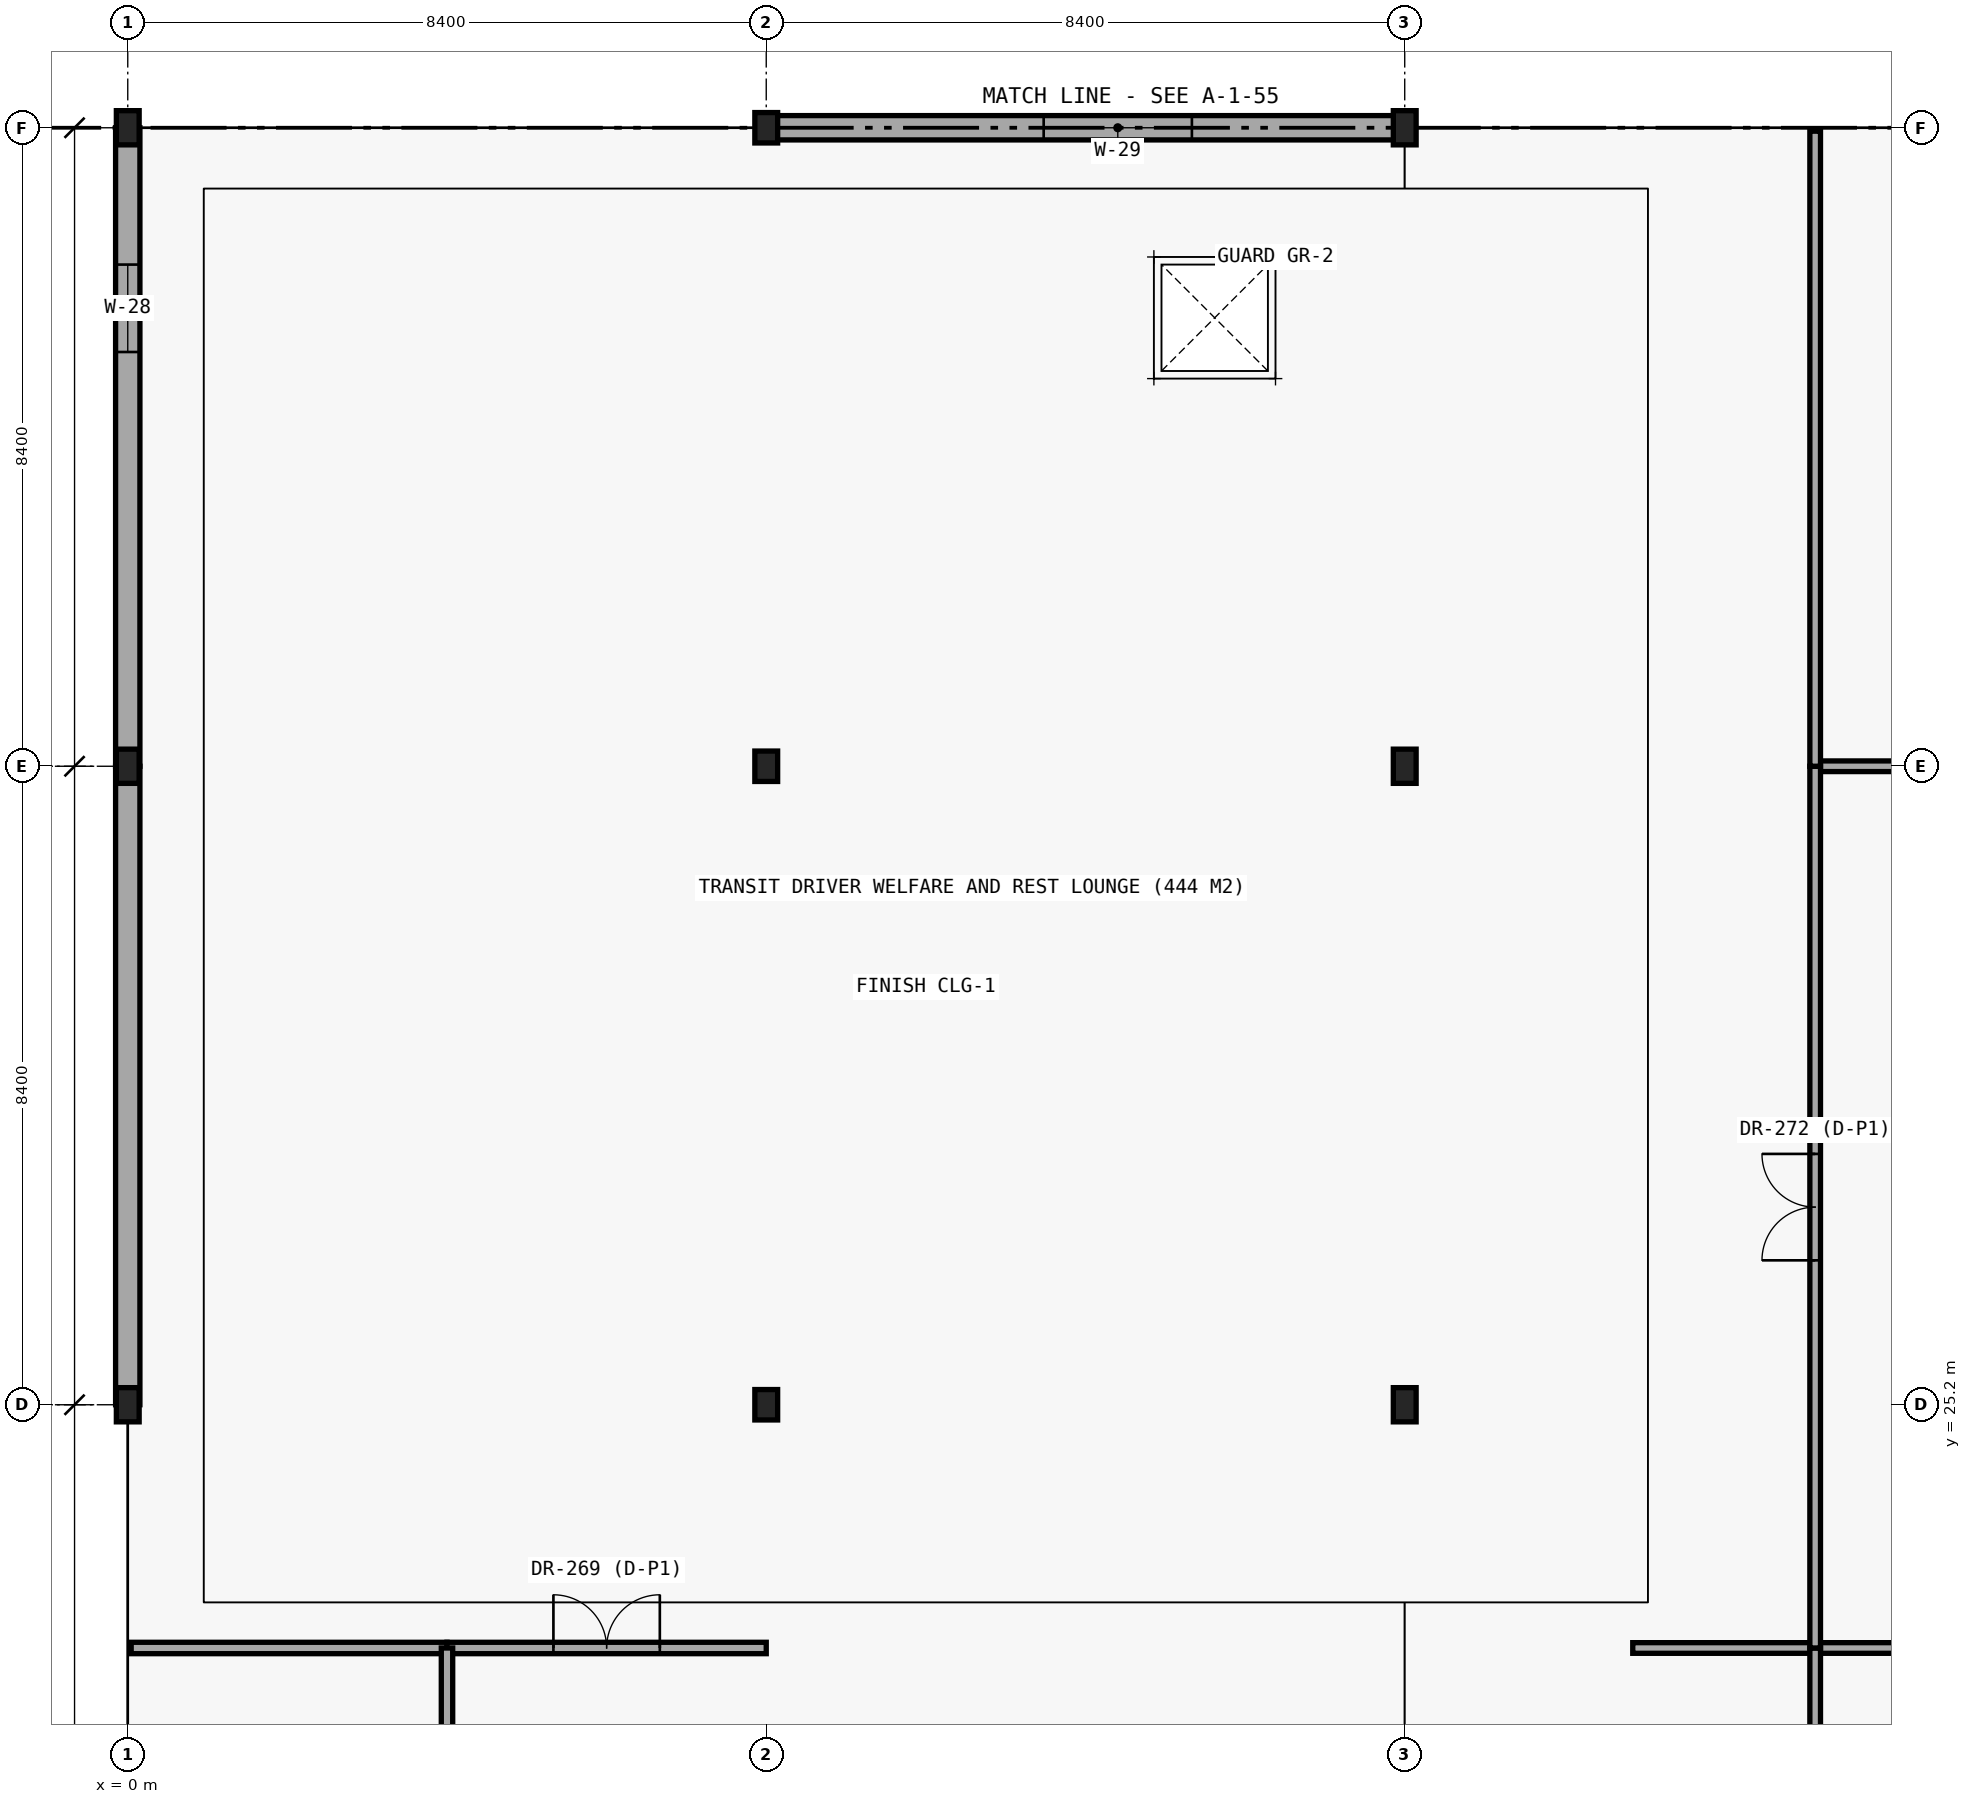
"""IFC4 building model, lengths in metres.
Left out: names, types, materials, properties, quantities, classifications, styles, units other than length and angle.
Written with IfcOpenShell. Run it as: python <this file> out.ifc"""

import sys

from ifc_helpers import new_model, si_unit, direction, frame, frame_2d, origin, origin_2d, place, context, subcontext, project, spatial, rectangle, i_section, extrude, element, fill, save


model = new_model("IFC4")
c1 = context("Model", 3, precision=1e-05, world=origin(), true_north=direction((0.0, 1.0)))
c2 = subcontext(c1, "Body", "Model", "MODEL_VIEW")
j1 = project(units=[si_unit("LENGTHUNIT", "METRE"), si_unit("PLANEANGLEUNIT", "RADIAN")], contexts=[c1])
p1 = place(None, origin())
s1 = spatial("IfcSite", under=j1, at=p1, CompositionType="ELEMENT")
p2 = place(p1, origin())
s2 = spatial("IfcBuilding", under=s1, at=p2, CompositionType="ELEMENT")
p3 = place(p2, frame((0.0, 0.0, 21.6)))
s3 = spatial("IfcBuildingStorey", under=s2, at=p3, CompositionType="ELEMENT", Elevation=21.6)
for number, where, z_axis, x_axis in (
    (1, (0.0, 25.2, 0.0), (0.0, 0.0, 1.0), (1.0, 0.0, 0.0)),
    (2, (0.0, 33.6, 0.0), (0.0, 0.0, 1.0), (1.0, 0.0, 0.0)),
):
    element("IfcColumn", number, at=place(p3, frame(where, z_axis=z_axis, x_axis=x_axis)), inside=s3, PredefinedType="COLUMN", context=c2, shape_type="SweptSolid", body=[
        extrude(i_section(OverallWidth=0.3, OverallDepth=0.45, WebThickness=0.014, FlangeThickness=0.026, FilletRadius=0.027, at=origin_2d()), origin(), (0.0, 0.0, 1.0), 4.8),
    ])
p4 = place(p3, frame((0.0, 42.0, 0.0), z_axis=(0.0, 0.0, 1.0), x_axis=(1.0, 0.0, 0.0)))
e3 = element("IfcColumn", 3, at=p4, inside=s3, PredefinedType="COLUMN", context=c2, shape_type="SweptSolid", body=[
    extrude(i_section(OverallWidth=0.3, OverallDepth=0.45, WebThickness=0.014, FlangeThickness=0.026, FilletRadius=0.027, at=origin_2d()), origin(), (0.0, 0.0, 1.0), 4.558),
])
for number, where, z_axis, x_axis in (
    (4, (8.4, 25.2, 0.0), (0.0, 0.0, 1.0), (1.0, 0.0, 0.0)),
    (5, (8.4, 33.6, 0.0), (0.0, 0.0, 1.0), (1.0, 0.0, 0.0)),
):
    element("IfcColumn", number, at=place(p3, frame(where, z_axis=z_axis, x_axis=x_axis)), inside=s3, PredefinedType="COLUMN", context=c2, shape_type="SweptSolid", body=[
        extrude(i_section(OverallWidth=0.3, OverallDepth=0.4, WebThickness=0.013, FlangeThickness=0.024, FilletRadius=0.027, at=origin_2d()), origin(), (0.0, 0.0, 1.0), 4.8),
    ])
p5 = place(p3, frame((8.4, 42.0, 0.0), z_axis=(0.0, 0.0, 1.0), x_axis=(1.0, 0.0, 0.0)))
e6 = element("IfcColumn", 6, at=p5, inside=s3, PredefinedType="COLUMN", context=c2, shape_type="SweptSolid", body=[
    extrude(i_section(OverallWidth=0.3, OverallDepth=0.4, WebThickness=0.013, FlangeThickness=0.024, FilletRadius=0.027, at=origin_2d()), origin(), (0.0, 0.0, 1.0), 4.558),
])
for number, where, z_axis, x_axis in (
    (7, (16.8, 25.2, 0.0), (0.0, 0.0, 1.0), (1.0, 0.0, 0.0)),
    (8, (16.8, 33.6, 0.0), (0.0, 0.0, 1.0), (1.0, 0.0, 0.0)),
):
    element("IfcColumn", number, at=place(p3, frame(where, z_axis=z_axis, x_axis=x_axis)), inside=s3, PredefinedType="COLUMN", context=c2, shape_type="SweptSolid", body=[
        extrude(i_section(OverallWidth=0.3, OverallDepth=0.45, WebThickness=0.014, FlangeThickness=0.026, FilletRadius=0.027, at=origin_2d()), origin(), (0.0, 0.0, 1.0), 4.8),
    ])
p6 = place(p3, frame((16.8, 42.0, 0.0), z_axis=(0.0, 0.0, 1.0), x_axis=(1.0, 0.0, 0.0)))
e9 = element("IfcColumn", 9, at=p6, inside=s3, PredefinedType="COLUMN", context=c2, shape_type="SweptSolid", body=[
    extrude(i_section(OverallWidth=0.3, OverallDepth=0.45, WebThickness=0.014, FlangeThickness=0.026, FilletRadius=0.027, at=origin_2d()), origin(), (0.0, 0.0, 1.0), 4.558),
])
p7 = place(p3, frame((0.0, 33.6, 0.0), z_axis=(0.0, 0.0, 1.0), x_axis=(0.0, -1.0, 0.0)))
e10 = element("IfcWall", 10, at=p7, inside=s3, PredefinedType="STANDARD", context=c2, shape_type="SweptSolid", body=[
    extrude(rectangle(XDim=8.4, YDim=0.32, at=frame_2d((4.2, 0.0))), origin(), (0.0, 0.0, 1.0), 4.22),
])
p8 = place(p3, frame((0.0, 42.0, 0.0), z_axis=(0.0, 0.0, 1.0), x_axis=(0.0, -1.0, 0.0)))
e11 = element("IfcWall", 11, at=p8, inside=s3, PredefinedType="STANDARD", context=c2, shape_type="SweptSolid", body=[
    extrude(rectangle(XDim=8.4, YDim=0.32, at=frame_2d((4.2, 0.0))), origin(), (0.0, 0.0, 1.0), 4.22),
])
p9 = place(p8, frame((1.8, 0.0, 0.85)))
e12 = element("IfcOpeningElement", 12, at=p9, cuts=e11, PredefinedType="OPENING", context=c2, shape_type="SweptSolid", body=[
    extrude(rectangle(XDim=1.15, YDim=2.35, at=frame_2d((0.575, 1.175))), frame((0.0, 0.17, 0.0), z_axis=(0.0, -1.0, 0.0), x_axis=(1.0, 0.0, 0.0)), (0.0, 0.0, 1.0), 0.34),
])
p10 = place(p3, frame((16.8, 42.0, 0.0), z_axis=(0.0, 0.0, 1.0), x_axis=(-1.0, 0.0, 0.0)))
e13 = element("IfcWall", 13, at=p10, inside=s3, PredefinedType="STANDARD", context=c2, shape_type="SweptSolid", body=[
    extrude(rectangle(XDim=8.4, YDim=0.32, at=frame_2d((4.2, 0.0))), origin(), (0.0, 0.0, 1.0), 4.22),
])
p11 = place(p10, frame((2.8, 0.0, 0.85)))
e14 = element("IfcOpeningElement", 14, at=p11, cuts=e13, PredefinedType="OPENING", context=c2, shape_type="SweptSolid", body=[
    extrude(rectangle(XDim=1.95, YDim=2.3, at=frame_2d((0.975, 1.15))), frame((0.0, 0.17, 0.0), z_axis=(0.0, -1.0, 0.0), x_axis=(1.0, 0.0, 0.0)), (0.0, 0.0, 1.0), 0.34),
])
p12 = place(p3, frame((0.045, 22.0, 0.0), z_axis=(0.0, 0.0, 1.0), x_axis=(1.0, 0.0, 0.0)))
e15 = element("IfcWall", 15, at=p12, inside=s3, PredefinedType="PARTITIONING", context=c2, shape_type="SweptSolid", body=[
    extrude(rectangle(XDim=4.155, YDim=0.15, at=frame_2d((2.078, 0.0))), origin(), (0.0, 0.0, 1.0), 4.1),
])
p13 = place(p3, frame((4.2, 22.0, 0.0), z_axis=(0.0, 0.0, 1.0), x_axis=(1.0, 0.0, 0.0)))
e16 = element("IfcWall", 16, at=p13, inside=s3, PredefinedType="PARTITIONING", context=c2, shape_type="SweptSolid", body=[
    extrude(rectangle(XDim=4.2, YDim=0.15, at=frame_2d((2.1, 0.0))), origin(), (0.0, 0.0, 1.0), 4.1),
])
p14 = place(p13, frame((1.4, 0.0, 0.0)))
e17 = element("IfcOpeningElement", 17, at=p14, cuts=e16, PredefinedType="OPENING", context=c2, shape_type="SweptSolid", body=[
    extrude(rectangle(XDim=1.4, YDim=2.25, at=frame_2d((0.7, 1.125))), frame((0.0, 0.085, 0.0), z_axis=(0.0, -1.0, 0.0), x_axis=(1.0, 0.0, 0.0)), (0.0, 0.0, 1.0), 0.17),
])
p15 = place(p3, frame((19.8, 22.0, 0.0), z_axis=(0.0, 0.0, 1.0), x_axis=(1.0, 0.0, 0.0)))
e18 = element("IfcWall", 18, at=p15, inside=s3, PredefinedType="PARTITIONING", context=c2, shape_type="SweptSolid", body=[
    extrude(rectangle(XDim=2.4, YDim=0.14, at=frame_2d((1.2, 0.0))), origin(), (0.0, 0.0, 1.0), 4.1),
])
p16 = place(p3, frame((22.2, 22.0, 0.0), z_axis=(0.0, 0.0, 1.0), x_axis=(1.0, 0.0, 0.0)))
e19 = element("IfcWall", 19, at=p16, inside=s3, PredefinedType="PARTITIONING", context=c2, shape_type="SweptSolid", body=[
    extrude(rectangle(XDim=11.4, YDim=0.14, at=frame_2d((5.7, 0.0))), origin(), (0.0, 0.0, 1.0), 4.1),
])
p17 = place(p3, frame((22.2, 33.6, 0.0), z_axis=(0.0, 0.0, 1.0), x_axis=(1.0, 0.0, 0.0)))
e20 = element("IfcWall", 20, at=p17, inside=s3, PredefinedType="PARTITIONING", context=c2, shape_type="SweptSolid", body=[
    extrude(rectangle(XDim=11.4, YDim=0.14, at=frame_2d((5.7, 0.0))), origin(), (0.0, 0.0, 1.0), 4.1),
])
p18 = place(p17, frame((8.22, 0.0, 0.0)))
e21 = element("IfcOpeningElement", 21, at=p18, cuts=e20, PredefinedType="OPENING", context=c2, shape_type="SweptSolid", body=[
    extrude(rectangle(XDim=1.0, YDim=2.15, at=frame_2d((0.5, 1.075))), frame((0.0, 0.08, 0.0), z_axis=(0.0, -1.0, 0.0), x_axis=(1.0, 0.0, 0.0)), (0.0, 0.0, 1.0), 0.16),
])
p19 = place(p3, frame((4.2, 16.8, 0.0), z_axis=(0.0, 0.0, 1.0), x_axis=(0.0, 1.0, 0.0)))
e22 = element("IfcWall", 22, at=p19, inside=s3, PredefinedType="PARTITIONING", context=c2, shape_type="SweptSolid", body=[
    extrude(rectangle(XDim=5.2, YDim=0.15, at=frame_2d((2.6, 0.0))), origin(), (0.0, 0.0, 1.0), 4.1),
])
p20 = place(p19, frame((2.075, 0.0, 0.0)))
e23 = element("IfcOpeningElement", 23, at=p20, cuts=e22, PredefinedType="OPENING", context=c2, shape_type="SweptSolid", body=[
    extrude(rectangle(XDim=1.05, YDim=2.15, at=frame_2d((0.525, 1.075))), frame((0.0, 0.085, 0.0), z_axis=(0.0, -1.0, 0.0), x_axis=(1.0, 0.0, 0.0)), (0.0, 0.0, 1.0), 0.17),
])
p21 = place(p3, frame((22.2, 16.8, 0.0), z_axis=(0.0, 0.0, 1.0), x_axis=(0.0, 1.0, 0.0)))
e24 = element("IfcWall", 24, at=p21, inside=s3, PredefinedType="PARTITIONING", context=c2, shape_type="SweptSolid", body=[
    extrude(rectangle(XDim=5.2, YDim=0.14, at=frame_2d((2.6, 0.0))), origin(), (0.0, 0.0, 1.0), 4.1),
])
p22 = place(p3, frame((22.2, 22.0, 0.0), z_axis=(0.0, 0.0, 1.0), x_axis=(0.0, 1.0, 0.0)))
e25 = element("IfcWall", 25, at=p22, inside=s3, PredefinedType="PARTITIONING", context=c2, shape_type="SweptSolid", body=[
    extrude(rectangle(XDim=11.6, YDim=0.14, at=frame_2d((5.8, 0.0))), origin(), (0.0, 0.0, 1.0), 4.1),
])
p23 = place(p22, frame((5.1, 0.0, 0.0)))
e26 = element("IfcOpeningElement", 26, at=p23, cuts=e25, PredefinedType="OPENING", context=c2, shape_type="SweptSolid", body=[
    extrude(rectangle(XDim=1.4, YDim=2.25, at=frame_2d((0.7, 1.125))), frame((0.0, 0.08, 0.0), z_axis=(0.0, -1.0, 0.0), x_axis=(1.0, 0.0, 0.0)), (0.0, 0.0, 1.0), 0.16),
])
p24 = place(p3, frame((22.2, 33.6, 0.0), z_axis=(0.0, 0.0, 1.0), x_axis=(0.0, 1.0, 0.0)))
e27 = element("IfcWall", 27, at=p24, inside=s3, PredefinedType="PARTITIONING", context=c2, shape_type="SweptSolid", body=[
    extrude(rectangle(XDim=8.355, YDim=0.14, at=frame_2d((4.177, 0.0))), origin(), (0.0, 0.0, 1.0), 4.1),
])
p25 = place(p9, origin())
e28 = element("IfcWindow", 28, at=p25, inside=s3, PartitioningType="SINGLE_PANEL", PredefinedType="WINDOW", context=c2, shape_type="SweptSolid", body=[
    extrude(rectangle(XDim=1.15, YDim=2.35, at=frame_2d((0.575, 1.175))), frame((0.0, 0.03, 0.0), z_axis=(0.0, -1.0, 0.0), x_axis=(1.0, 0.0, 0.0)), (0.0, 0.0, 1.0), 0.06),
])
fill(e12, e28)
p26 = place(p11, origin())
e29 = element("IfcWindow", 29, at=p26, inside=s3, PartitioningType="SINGLE_PANEL", PredefinedType="WINDOW", context=c2, shape_type="SweptSolid", body=[
    extrude(rectangle(XDim=1.95, YDim=2.3, at=frame_2d((0.975, 1.15))), frame((0.0, 0.03, 0.0), z_axis=(0.0, -1.0, 0.0), x_axis=(1.0, 0.0, 0.0)), (0.0, 0.0, 1.0), 0.06),
])
fill(e14, e29)
p27 = place(p14, origin())
e30 = element("IfcDoor", 30, at=p27, inside=s3, OperationType="DOUBLE_DOOR_SINGLE_SWING", PredefinedType="DOOR", context=c2, shape_type="SweptSolid", body=[
    extrude(rectangle(XDim=1.4, YDim=2.25, at=frame_2d((0.7, 1.125))), frame((0.0, 0.025, 0.0), z_axis=(0.0, -1.0, 0.0), x_axis=(1.0, 0.0, 0.0)), (0.0, 0.0, 1.0), 0.05),
])
fill(e17, e30)
p28 = place(p23, origin())
e31 = element("IfcDoor", 31, at=p28, inside=s3, OperationType="DOUBLE_DOOR_SINGLE_SWING", PredefinedType="DOOR", context=c2, shape_type="SweptSolid", body=[
    extrude(rectangle(XDim=1.4, YDim=2.25, at=frame_2d((0.7, 1.125))), frame((0.0, 0.025, 0.0), z_axis=(0.0, -1.0, 0.0), x_axis=(1.0, 0.0, 0.0)), (0.0, 0.0, 1.0), 0.05),
])
fill(e26, e31)
save(model, sys.argv[1])
